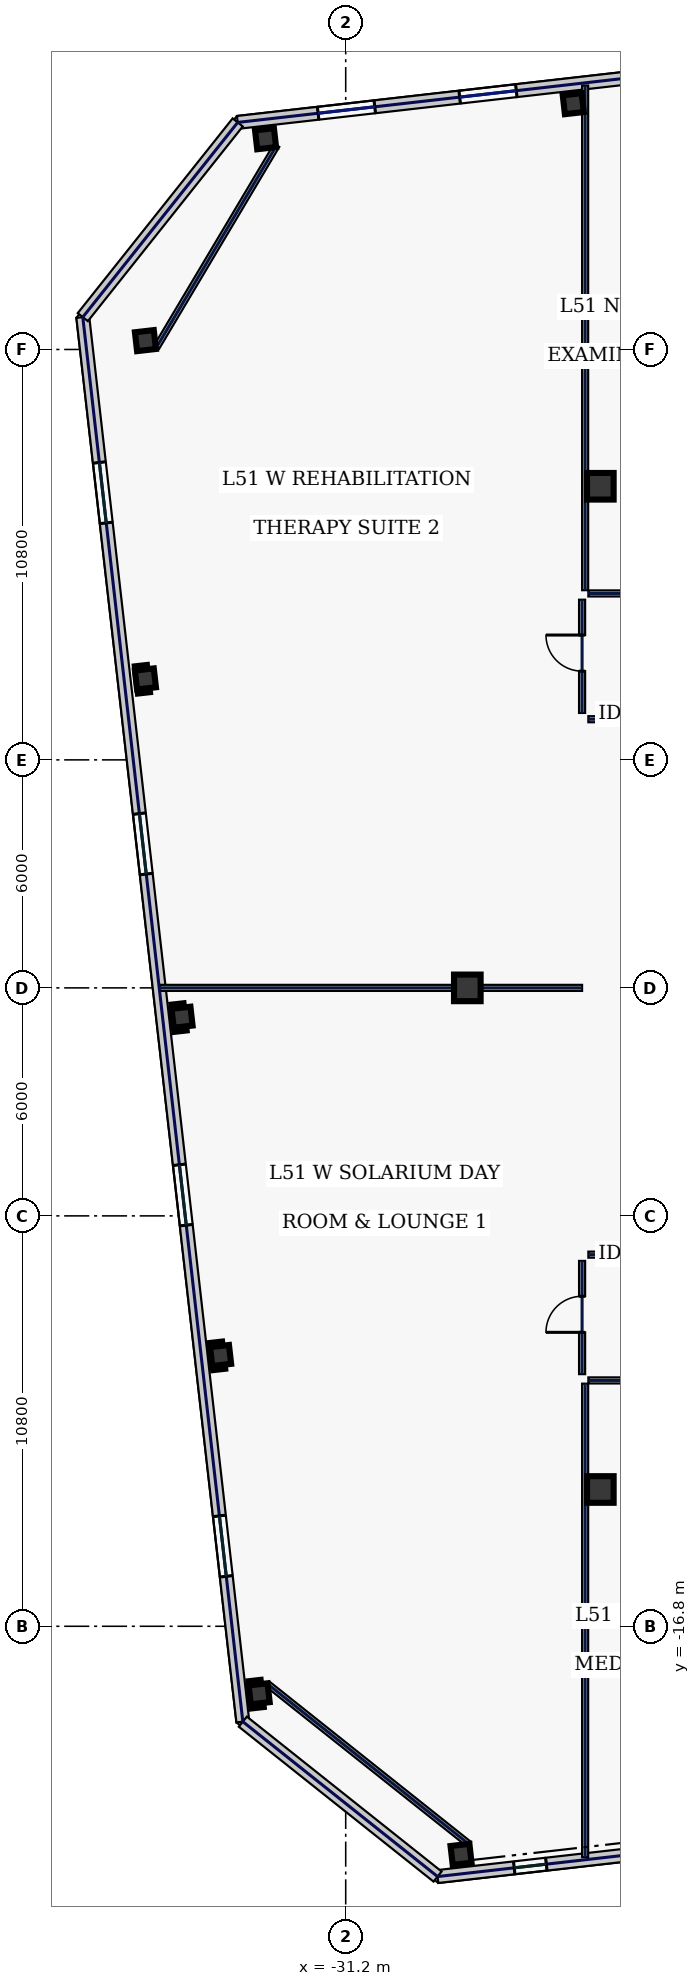
"""IFC4 building model, lengths in metres.
Left out: names, types, materials, properties, quantities, classifications, styles, units other than length and angle.
Written with IfcOpenShell. Run it as: python <this file> out.ifc"""

import sys

from ifc_helpers import new_model, si_unit, direction, frame, frame_2d, origin, origin_2d, place, context, subcontext, project, spatial, rectangle, hollow_rectangle, extrude, element, fill, save


model = new_model("IFC4")
c1 = context("Model", 3, precision=1e-05, world=origin(), true_north=direction((0.0, 1.0)))
c2 = subcontext(c1, "Body", "Model", "MODEL_VIEW")
j1 = project(units=[si_unit("LENGTHUNIT", "METRE"), si_unit("PLANEANGLEUNIT", "RADIAN")], contexts=[c1])
p1 = place(None, origin())
s1 = spatial("IfcSite", under=j1, at=p1, CompositionType="ELEMENT")
p2 = place(p1, origin())
s2 = spatial("IfcBuilding", under=s1, at=p2, CompositionType="ELEMENT")
p3 = place(p2, frame((0.0, 0.0, 222.2)))
s3 = spatial("IfcBuildingStorey", under=s2, at=p3, CompositionType="ELEMENT", Elevation=222.2)
for number, where, z_axis, x_axis in (
    (1, (-24.5, -13.2, 0.0), (0.0, 0.0, 1.0), (1.0, 0.0, 0.0)),
    (2, (-24.5, 13.2, 0.0), (0.0, 0.0, 1.0), (1.0, 0.0, 0.0)),
    (3, (-28.0, 0.0, 0.0), (0.0, 0.0, 1.0), (1.0, 0.0, 0.0)),
):
    element("IfcColumn", number, at=place(p3, frame(where, z_axis=z_axis, x_axis=x_axis)), inside=s3, PredefinedType="COLUMN", context=c2, shape_type="SweptSolid", body=[
        extrude(hollow_rectangle(XDim=0.7, YDim=0.7, WallThickness=0.032, at=origin_2d()), origin(), (0.0, 0.0, 1.0), 3.74),
    ])
for number, where, z_axis, x_axis in (
    (4, (-28.165, -22.802, 0.0), (0.0, 0.0, 1.0), (0.994, 0.113, 0.0)),
    (5, (-25.212, 23.268, 0.0), (0.0, 0.0, 1.0), (0.994, 0.113, 0.0)),
    (6, (-33.309, 22.345, 0.0), (0.0, 0.0, 1.0), (0.994, 0.113, 0.0)),
    (7, (-36.47, 17.033, 0.0), (0.0, 0.0, 1.0), (0.994, 0.113, 0.0)),
    (8, (-36.47, 8.131, 0.0), (0.0, 0.0, 1.0), (0.994, 0.113, 0.0)),
    (9, (-35.506, -0.772, 0.0), (0.0, 0.0, 1.0), (0.994, 0.113, 0.0)),
    (10, (-34.491, -9.674, 0.0), (0.0, 0.0, 1.0), (0.994, 0.113, 0.0)),
    (11, (-33.477, -18.577, 0.0), (0.0, 0.0, 1.0), (0.994, 0.113, 0.0)),
):
    element("IfcColumn", number, at=place(p3, frame(where, z_axis=z_axis, x_axis=x_axis)), inside=s3, PredefinedType="COLUMN", context=c2, shape_type="SweptSolid", body=[
        extrude(hollow_rectangle(XDim=0.5, YDim=0.5, WallThickness=0.025, at=origin_2d()), origin(), (0.0, 0.0, 1.0), 3.74),
    ])
p4 = place(p3, frame((-28.783, -23.386, 0.0), z_axis=(0.0, 0.0, 1.0), x_axis=(0.993572262951, 0.113199639106, 0.0)))
e12 = element("IfcWall", 12, at=p4, inside=s3, PredefinedType="STANDARD", context=c2, shape_type="SweptSolid", body=[
    extrude(rectangle(XDim=14.15, YDim=0.34, at=frame_2d((7.075, 0.0))), origin(), (0.0, 0.0, 1.0), 3.74),
])
p5 = place(p4, frame((2.03, 0.0, 0.88)))
e13 = element("IfcOpeningElement", 13, at=p5, cuts=e12, PredefinedType="OPENING", context=c2, shape_type="SweptSolid", body=[
    extrude(rectangle(XDim=0.85, YDim=1.85, at=frame_2d((0.425, 0.925))), frame((0.0, 0.18, 0.0), z_axis=(0.0, -1.0, 0.0), x_axis=(1.0, 0.0, 0.0)), (0.0, 0.0, 1.0), 0.36),
])
p6 = place(p4, frame((5.779, 0.0, 0.88)))
e14 = element("IfcOpeningElement", 14, at=p6, cuts=e12, PredefinedType="OPENING", context=c2, shape_type="SweptSolid", body=[
    extrude(rectangle(XDim=1.7, YDim=1.95, at=frame_2d((0.85, 0.975))), frame((0.0, 0.18, 0.0), z_axis=(0.0, -1.0, 0.0), x_axis=(1.0, 0.0, 0.0)), (0.0, 0.0, 1.0), 0.36),
])
p7 = place(p4, frame((10.179, 0.0, 0.88)))
e15 = element("IfcOpeningElement", 15, at=p7, cuts=e12, PredefinedType="OPENING", context=c2, shape_type="SweptSolid", body=[
    extrude(rectangle(XDim=1.7, YDim=1.95, at=frame_2d((0.85, 0.975))), frame((0.0, 0.18, 0.0), z_axis=(0.0, -1.0, 0.0), x_axis=(1.0, 0.0, 0.0)), (0.0, 0.0, 1.0), 0.36),
])
p8 = place(p3, frame((-15.51, 24.886, 0.0), z_axis=(0.0, 0.0, 1.0), x_axis=(-0.993572271362, -0.113199565282, 0.0)))
e16 = element("IfcWall", 16, at=p8, inside=s3, PredefinedType="STANDARD", context=c2, shape_type="SweptSolid", body=[
    extrude(rectangle(XDim=18.651, YDim=0.34, at=frame_2d((9.326, 0.0))), origin(), (0.0, 0.0, 1.0), 3.74),
])
p9 = place(p8, frame((15.021, 0.0, 0.83)))
e17 = element("IfcOpeningElement", 17, at=p9, cuts=e16, PredefinedType="OPENING", context=c2, shape_type="SweptSolid", body=[
    extrude(rectangle(XDim=1.5, YDim=2.0, at=frame_2d((0.75, 1.0))), frame((0.0, 0.18, 0.0), z_axis=(0.0, -1.0, 0.0), x_axis=(1.0, 0.0, 0.0)), (0.0, 0.0, 1.0), 0.36),
])
p10 = place(p8, frame((11.273, 0.0, 0.83)))
e18 = element("IfcOpeningElement", 18, at=p10, cuts=e16, PredefinedType="OPENING", context=c2, shape_type="SweptSolid", body=[
    extrude(rectangle(XDim=1.5, YDim=2.0, at=frame_2d((0.75, 1.0))), frame((0.0, 0.18, 0.0), z_axis=(0.0, -1.0, 0.0), x_axis=(1.0, 0.0, 0.0)), (0.0, 0.0, 1.0), 0.36),
])
p11 = place(p8, frame((6.873, 0.0, 0.83)))
e19 = element("IfcOpeningElement", 19, at=p11, cuts=e16, PredefinedType="OPENING", context=c2, shape_type="SweptSolid", body=[
    extrude(rectangle(XDim=1.5, YDim=2.0, at=frame_2d((0.75, 1.0))), frame((0.0, 0.18, 0.0), z_axis=(0.0, -1.0, 0.0), x_axis=(1.0, 0.0, 0.0)), (0.0, 0.0, 1.0), 0.36),
])
p12 = place(p8, frame((3.125, 0.0, 0.83)))
e20 = element("IfcOpeningElement", 20, at=p12, cuts=e16, PredefinedType="OPENING", context=c2, shape_type="SweptSolid", body=[
    extrude(rectangle(XDim=0.85, YDim=1.85, at=frame_2d((0.425, 0.925))), frame((0.0, 0.18, 0.0), z_axis=(0.0, -1.0, 0.0), x_axis=(1.0, 0.0, 0.0)), (0.0, 0.0, 1.0), 0.36),
])
p13 = place(p3, frame((-38.118, 17.651, 0.0), z_axis=(0.0, 0.0, 1.0), x_axis=(0.11320360501, -0.9935718111, 0.0)))
e21 = element("IfcWall", 21, at=p13, inside=s3, PredefinedType="STANDARD", context=c2, shape_type="SweptSolid", body=[
    extrude(rectangle(XDim=37.2, YDim=0.34, at=frame_2d((18.6, 0.0))), origin(), (0.0, 0.0, 1.0), 3.74),
])
p14 = place(p13, frame((3.85, 0.0, 0.58)))
e22 = element("IfcOpeningElement", 22, at=p14, cuts=e21, PredefinedType="OPENING", context=c2, shape_type="SweptSolid", body=[
    extrude(rectangle(XDim=1.6, YDim=2.3, at=frame_2d((0.8, 1.15))), frame((0.0, 0.18, 0.0), z_axis=(0.0, -1.0, 0.0), x_axis=(1.0, 0.0, 0.0)), (0.0, 0.0, 1.0), 0.36),
])
p15 = place(p13, frame((13.15, 0.0, 0.58)))
e23 = element("IfcOpeningElement", 23, at=p15, cuts=e21, PredefinedType="OPENING", context=c2, shape_type="SweptSolid", body=[
    extrude(rectangle(XDim=1.6, YDim=2.3, at=frame_2d((0.8, 1.15))), frame((0.0, 0.18, 0.0), z_axis=(0.0, -1.0, 0.0), x_axis=(1.0, 0.0, 0.0)), (0.0, 0.0, 1.0), 0.36),
])
p16 = place(p13, frame((22.45, 0.0, 0.58)))
e24 = element("IfcOpeningElement", 24, at=p16, cuts=e21, PredefinedType="OPENING", context=c2, shape_type="SweptSolid", body=[
    extrude(rectangle(XDim=1.6, YDim=2.3, at=frame_2d((0.8, 1.15))), frame((0.0, 0.18, 0.0), z_axis=(0.0, -1.0, 0.0), x_axis=(1.0, 0.0, 0.0)), (0.0, 0.0, 1.0), 0.36),
])
p17 = place(p13, frame((31.75, 0.0, 0.58)))
e25 = element("IfcOpeningElement", 25, at=p17, cuts=e21, PredefinedType="OPENING", context=c2, shape_type="SweptSolid", body=[
    extrude(rectangle(XDim=1.6, YDim=2.3, at=frame_2d((0.8, 1.15))), frame((0.0, 0.18, 0.0), z_axis=(0.0, -1.0, 0.0), x_axis=(1.0, 0.0, 0.0)), (0.0, 0.0, 1.0), 0.36),
])
for number, where, z_axis, x_axis in (
    (26, (-34.042, 22.775, 0.0), (0.0, 0.0, 1.0), (-0.623, -0.783, 0.0)),
    (27, (-33.907, -19.31, 0.0), (0.0, 0.0, 1.0), (0.783, -0.623, 0.0)),
):
    element("IfcWall", number, at=place(p3, frame(where, z_axis=z_axis, x_axis=x_axis)), inside=s3, PredefinedType="STANDARD", context=c2, shape_type="SweptSolid", body=[
        extrude(rectangle(XDim=6.548, YDim=0.34, at=frame_2d((3.274, 0.0))), origin(), (0.0, 0.0, 1.0), 3.74),
    ])
p18 = place(p3, frame((-33.016, 22.171, 0.0), z_axis=(0.0, 0.0, 1.0), x_axis=(-0.511385266265, -0.859351563359, 0.0)))
e28 = element("IfcWall", 28, at=p18, inside=s3, PredefinedType="PARTITIONING", context=c2, shape_type="SweptSolid", body=[
    extrude(rectangle(XDim=6.182, YDim=0.16, at=frame_2d((3.091, 0.0))), origin(), (0.0, 0.0, 1.0), 3.74),
])
p19 = place(p3, frame((-33.265, -18.311, 0.0), z_axis=(0.0, 0.0, 1.0), x_axis=(0.782602647064, -0.622521563328, 0.0)))
e29 = element("IfcWall", 29, at=p19, inside=s3, PredefinedType="PARTITIONING", context=c2, shape_type="SweptSolid", body=[
    extrude(rectangle(XDim=6.788, YDim=0.16, at=frame_2d((3.394, 0.0))), origin(), (0.0, 0.0, 1.0), 3.74),
])
p20 = place(p3, frame((-24.98, -10.165, 0.0), z_axis=(0.0, 0.0, 1.0), x_axis=(0.0, 1.0, 0.0)))
e30 = element("IfcWall", 30, at=p20, inside=s3, PredefinedType="PARTITIONING", context=c2, shape_type="SweptSolid", body=[
    extrude(rectangle(XDim=2.98, YDim=0.16, at=frame_2d((1.49, 0.0))), origin(), (0.0, 0.0, 1.0), 3.74),
])
p21 = place(p20, frame((1.1, 0.0, 0.0)))
e31 = element("IfcOpeningElement", 31, at=p21, cuts=e30, PredefinedType="OPENING", context=c2, shape_type="SweptSolid", body=[
    extrude(rectangle(XDim=0.95, YDim=2.2, at=frame_2d((0.475, 1.1))), frame((0.0, 0.09, 0.0), z_axis=(0.0, -1.0, 0.0), x_axis=(1.0, 0.0, 0.0)), (0.0, 0.0, 1.0), 0.18),
])
for number, where, z_axis, x_axis in (
    (32, (-24.815, -7.02, 0.0), (0.0, 0.0, 1.0), (1.0, 0.0, 0.0)),
    (33, (-10.715, 7.07, 0.0), (0.0, 0.0, 1.0), (-1.0, 0.0, 0.0)),
):
    element("IfcWall", number, at=place(p3, frame(where, z_axis=z_axis, x_axis=x_axis)), inside=s3, PredefinedType="PARTITIONING", context=c2, shape_type="SweptSolid", body=[
        extrude(rectangle(XDim=14.1, YDim=0.16, at=frame_2d((7.05, 0.0))), origin(), (0.0, 0.0, 1.0), 3.74),
    ])
p22 = place(p3, frame((-24.98, 7.235, 0.0), z_axis=(0.0, 0.0, 1.0), x_axis=(0.0, 1.0, 0.0)))
e34 = element("IfcWall", 34, at=p22, inside=s3, PredefinedType="PARTITIONING", context=c2, shape_type="SweptSolid", body=[
    extrude(rectangle(XDim=2.98, YDim=0.16, at=frame_2d((1.49, 0.0))), origin(), (0.0, 0.0, 1.0), 3.74),
])
p23 = place(p22, frame((1.1, 0.0, 0.0)))
e35 = element("IfcOpeningElement", 35, at=p23, cuts=e34, PredefinedType="OPENING", context=c2, shape_type="SweptSolid", body=[
    extrude(rectangle(XDim=0.95, YDim=2.2, at=frame_2d((0.475, 1.1))), frame((0.0, 0.09, 0.0), z_axis=(0.0, -1.0, 0.0), x_axis=(1.0, 0.0, 0.0)), (0.0, 0.0, 1.0), 0.18),
])
p24 = place(p3, frame((-24.815, 10.38, 0.0), z_axis=(0.0, 0.0, 1.0), x_axis=(1.0, 0.0, 0.0)))
e36 = element("IfcWall", 36, at=p24, inside=s3, PredefinedType="PARTITIONING", context=c2, shape_type="SweptSolid", body=[
    extrude(rectangle(XDim=49.63, YDim=0.16, at=frame_2d((24.815, 0.0))), origin(), (0.0, 0.0, 1.0), 3.74),
])
p25 = place(p24, frame((2.044, 0.0, 0.0)))
e37 = element("IfcOpeningElement", 37, at=p25, cuts=e36, PredefinedType="OPENING", context=c2, shape_type="SweptSolid", body=[
    extrude(rectangle(XDim=0.95, YDim=2.2, at=frame_2d((0.475, 1.1))), frame((0.0, 0.09, 0.0), z_axis=(0.0, -1.0, 0.0), x_axis=(1.0, 0.0, 0.0)), (0.0, 0.0, 1.0), 0.18),
])
p26 = place(p24, frame((6.72, 0.0, 0.0)))
e38 = element("IfcOpeningElement", 38, at=p26, cuts=e36, PredefinedType="OPENING", context=c2, shape_type="SweptSolid", body=[
    extrude(rectangle(XDim=0.95, YDim=2.2, at=frame_2d((0.475, 1.1))), frame((0.0, 0.09, 0.0), z_axis=(0.0, -1.0, 0.0), x_axis=(1.0, 0.0, 0.0)), (0.0, 0.0, 1.0), 0.18),
])
p27 = place(p24, frame((12.13, 0.0, 0.0)))
e39 = element("IfcOpeningElement", 39, at=p27, cuts=e36, PredefinedType="OPENING", context=c2, shape_type="SweptSolid", body=[
    extrude(rectangle(XDim=0.95, YDim=2.2, at=frame_2d((0.475, 1.1))), frame((0.0, 0.09, 0.0), z_axis=(0.0, -1.0, 0.0), x_axis=(1.0, 0.0, 0.0)), (0.0, 0.0, 1.0), 0.18),
])
p28 = place(p24, frame((17.235, 0.0, 0.0)))
e40 = element("IfcOpeningElement", 40, at=p28, cuts=e36, PredefinedType="OPENING", context=c2, shape_type="SweptSolid", body=[
    extrude(rectangle(XDim=1.3, YDim=2.2, at=frame_2d((0.65, 1.1))), frame((0.0, 0.09, 0.0), z_axis=(0.0, -1.0, 0.0), x_axis=(1.0, 0.0, 0.0)), (0.0, 0.0, 1.0), 0.18),
])
p29 = place(p24, frame((22.89, 0.0, 0.0)))
e41 = element("IfcOpeningElement", 41, at=p29, cuts=e36, PredefinedType="OPENING", context=c2, shape_type="SweptSolid", body=[
    extrude(rectangle(XDim=1.3, YDim=2.2, at=frame_2d((0.65, 1.1))), frame((0.0, 0.09, 0.0), z_axis=(0.0, -1.0, 0.0), x_axis=(1.0, 0.0, 0.0)), (0.0, 0.0, 1.0), 0.18),
])
p30 = place(p24, frame((27.925, 0.0, 0.0)))
e42 = element("IfcOpeningElement", 42, at=p30, cuts=e36, PredefinedType="OPENING", context=c2, shape_type="SweptSolid", body=[
    extrude(rectangle(XDim=0.95, YDim=2.2, at=frame_2d((0.475, 1.1))), frame((0.0, 0.09, 0.0), z_axis=(0.0, -1.0, 0.0), x_axis=(1.0, 0.0, 0.0)), (0.0, 0.0, 1.0), 0.18),
])
p31 = place(p24, frame((34.445, 0.0, 0.0)))
e43 = element("IfcOpeningElement", 43, at=p31, cuts=e36, PredefinedType="OPENING", context=c2, shape_type="SweptSolid", body=[
    extrude(rectangle(XDim=0.95, YDim=2.2, at=frame_2d((0.475, 1.1))), frame((0.0, 0.09, 0.0), z_axis=(0.0, -1.0, 0.0), x_axis=(1.0, 0.0, 0.0)), (0.0, 0.0, 1.0), 0.18),
])
p32 = place(p24, frame((39.645, 0.0, 0.0)))
e44 = element("IfcOpeningElement", 44, at=p32, cuts=e36, PredefinedType="OPENING", context=c2, shape_type="SweptSolid", body=[
    extrude(rectangle(XDim=0.95, YDim=2.2, at=frame_2d((0.475, 1.1))), frame((0.0, 0.09, 0.0), z_axis=(0.0, -1.0, 0.0), x_axis=(1.0, 0.0, 0.0)), (0.0, 0.0, 1.0), 0.18),
])
p33 = place(p24, frame((45.281, 0.0, 0.0)))
e45 = element("IfcOpeningElement", 45, at=p33, cuts=e36, PredefinedType="OPENING", context=c2, shape_type="SweptSolid", body=[
    extrude(rectangle(XDim=0.95, YDim=2.2, at=frame_2d((0.475, 1.1))), frame((0.0, 0.09, 0.0), z_axis=(0.0, -1.0, 0.0), x_axis=(1.0, 0.0, 0.0)), (0.0, 0.0, 1.0), 0.18),
])
p34 = place(p3, frame((24.815, -10.33, 0.0), z_axis=(0.0, 0.0, 1.0), x_axis=(-1.0, 0.0, 0.0)))
e46 = element("IfcWall", 46, at=p34, inside=s3, PredefinedType="PARTITIONING", context=c2, shape_type="SweptSolid", body=[
    extrude(rectangle(XDim=49.63, YDim=0.16, at=frame_2d((24.815, 0.0))), origin(), (0.0, 0.0, 1.0), 3.74),
])
p35 = place(p34, frame((46.631, 0.0, 0.0)))
e47 = element("IfcOpeningElement", 47, at=p35, cuts=e46, PredefinedType="OPENING", context=c2, shape_type="SweptSolid", body=[
    extrude(rectangle(XDim=1.3, YDim=2.2, at=frame_2d((0.65, 1.1))), frame((0.0, 0.09, 0.0), z_axis=(0.0, -1.0, 0.0), x_axis=(1.0, 0.0, 0.0)), (0.0, 0.0, 1.0), 0.18),
])
p36 = place(p34, frame((42.13, 0.0, 0.0)))
e48 = element("IfcOpeningElement", 48, at=p36, cuts=e46, PredefinedType="OPENING", context=c2, shape_type="SweptSolid", body=[
    extrude(rectangle(XDim=0.95, YDim=2.2, at=frame_2d((0.475, 1.1))), frame((0.0, 0.09, 0.0), z_axis=(0.0, -1.0, 0.0), x_axis=(1.0, 0.0, 0.0)), (0.0, 0.0, 1.0), 0.18),
])
p37 = place(p34, frame((33.55, 0.0, 0.0)))
e49 = element("IfcOpeningElement", 49, at=p37, cuts=e46, PredefinedType="OPENING", context=c2, shape_type="SweptSolid", body=[
    extrude(rectangle(XDim=1.15, YDim=2.2, at=frame_2d((0.575, 1.1))), frame((0.0, 0.09, 0.0), z_axis=(0.0, -1.0, 0.0), x_axis=(1.0, 0.0, 0.0)), (0.0, 0.0, 1.0), 0.18),
])
p38 = place(p34, frame((25.89, 0.0, 0.0)))
e50 = element("IfcOpeningElement", 50, at=p38, cuts=e46, PredefinedType="OPENING", context=c2, shape_type="SweptSolid", body=[
    extrude(rectangle(XDim=0.95, YDim=2.2, at=frame_2d((0.475, 1.1))), frame((0.0, 0.09, 0.0), z_axis=(0.0, -1.0, 0.0), x_axis=(1.0, 0.0, 0.0)), (0.0, 0.0, 1.0), 0.18),
])
p39 = place(p34, frame((14.965, 0.0, 0.0)))
e51 = element("IfcOpeningElement", 51, at=p39, cuts=e46, PredefinedType="OPENING", context=c2, shape_type="SweptSolid", body=[
    extrude(rectangle(XDim=0.95, YDim=2.2, at=frame_2d((0.475, 1.1))), frame((0.0, 0.09, 0.0), z_axis=(0.0, -1.0, 0.0), x_axis=(1.0, 0.0, 0.0)), (0.0, 0.0, 1.0), 0.18),
])
p40 = place(p34, frame((6.24, 0.0, 0.0)))
e52 = element("IfcOpeningElement", 52, at=p40, cuts=e46, PredefinedType="OPENING", context=c2, shape_type="SweptSolid", body=[
    extrude(rectangle(XDim=1.05, YDim=2.2, at=frame_2d((0.525, 1.1))), frame((0.0, 0.09, 0.0), z_axis=(0.0, -1.0, 0.0), x_axis=(1.0, 0.0, 0.0)), (0.0, 0.0, 1.0), 0.18),
])
p41 = place(p34, frame((1.869, 0.0, 0.0)))
e53 = element("IfcOpeningElement", 53, at=p41, cuts=e46, PredefinedType="OPENING", context=c2, shape_type="SweptSolid", body=[
    extrude(rectangle(XDim=1.3, YDim=2.2, at=frame_2d((0.65, 1.1))), frame((0.0, 0.09, 0.0), z_axis=(0.0, -1.0, 0.0), x_axis=(1.0, 0.0, 0.0)), (0.0, 0.0, 1.0), 0.18),
])
p42 = place(p3, frame((-24.9, 10.465, 0.0), z_axis=(0.0, 0.0, 1.0), x_axis=(0.0, 1.0, 0.0)))
e54 = element("IfcWall", 54, at=p42, inside=s3, PredefinedType="PARTITIONING", context=c2, shape_type="SweptSolid", body=[
    extrude(rectangle(XDim=13.281, YDim=0.16, at=frame_2d((6.641, 0.0))), origin(), (0.0, 0.0, 1.0), 2.135),
])
p43 = place(p3, frame((-24.9, -22.873, 0.0), z_axis=(0.0, 0.0, 1.0), x_axis=(0.0, 1.0, 0.0)))
e55 = element("IfcWall", 55, at=p43, inside=s3, PredefinedType="PARTITIONING", context=c2, shape_type="SweptSolid", body=[
    extrude(rectangle(XDim=12.458, YDim=0.16, at=frame_2d((6.229, 0.0))), origin(), (0.0, 0.0, 1.0), 3.74),
])
p44 = place(p3, frame((-36.087, 0.0, 0.0), z_axis=(0.0, 0.0, 1.0), x_axis=(1.0, 0.0, 0.0)))
e56 = element("IfcWall", 56, at=p44, inside=s3, PredefinedType="PARTITIONING", context=c2, shape_type="SweptSolid", body=[
    extrude(rectangle(XDim=11.107, YDim=0.16, at=frame_2d((5.553, 0.0))), origin(), (0.0, 0.0, 1.0), 2.135),
])
p45 = place(p5, origin())
e57 = element("IfcWindow", 57, at=p45, inside=s3, PartitioningType="SINGLE_PANEL", PredefinedType="WINDOW", context=c2, shape_type="SweptSolid", body=[
    extrude(rectangle(XDim=0.85, YDim=1.85, at=frame_2d((0.425, 0.925))), frame((0.0, 0.03, 0.0), z_axis=(0.0, -1.0, 0.0), x_axis=(1.0, 0.0, 0.0)), (0.0, 0.0, 1.0), 0.06),
])
fill(e13, e57)
p46 = place(p9, origin())
e58 = element("IfcWindow", 58, at=p46, inside=s3, PartitioningType="SINGLE_PANEL", PredefinedType="WINDOW", context=c2, shape_type="SweptSolid", body=[
    extrude(rectangle(XDim=1.5, YDim=2.0, at=frame_2d((0.75, 1.0))), frame((0.0, 0.03, 0.0), z_axis=(0.0, -1.0, 0.0), x_axis=(1.0, 0.0, 0.0)), (0.0, 0.0, 1.0), 0.06),
])
fill(e17, e58)
p47 = place(p10, origin())
e59 = element("IfcWindow", 59, at=p47, inside=s3, PartitioningType="SINGLE_PANEL", PredefinedType="WINDOW", context=c2, shape_type="SweptSolid", body=[
    extrude(rectangle(XDim=1.5, YDim=2.0, at=frame_2d((0.75, 1.0))), frame((0.0, 0.03, 0.0), z_axis=(0.0, -1.0, 0.0), x_axis=(1.0, 0.0, 0.0)), (0.0, 0.0, 1.0), 0.06),
])
fill(e18, e59)
p48 = place(p14, origin())
e60 = element("IfcWindow", 60, at=p48, inside=s3, PartitioningType="SINGLE_PANEL", PredefinedType="WINDOW", context=c2, shape_type="SweptSolid", body=[
    extrude(rectangle(XDim=1.6, YDim=2.3, at=frame_2d((0.8, 1.15))), frame((0.0, 0.03, 0.0), z_axis=(0.0, -1.0, 0.0), x_axis=(1.0, 0.0, 0.0)), (0.0, 0.0, 1.0), 0.06),
])
fill(e22, e60)
p49 = place(p15, origin())
e61 = element("IfcWindow", 61, at=p49, inside=s3, PartitioningType="SINGLE_PANEL", PredefinedType="WINDOW", context=c2, shape_type="SweptSolid", body=[
    extrude(rectangle(XDim=1.6, YDim=2.3, at=frame_2d((0.8, 1.15))), frame((0.0, 0.03, 0.0), z_axis=(0.0, -1.0, 0.0), x_axis=(1.0, 0.0, 0.0)), (0.0, 0.0, 1.0), 0.06),
])
fill(e23, e61)
p50 = place(p16, origin())
e62 = element("IfcWindow", 62, at=p50, inside=s3, PartitioningType="SINGLE_PANEL", PredefinedType="WINDOW", context=c2, shape_type="SweptSolid", body=[
    extrude(rectangle(XDim=1.6, YDim=2.3, at=frame_2d((0.8, 1.15))), frame((0.0, 0.03, 0.0), z_axis=(0.0, -1.0, 0.0), x_axis=(1.0, 0.0, 0.0)), (0.0, 0.0, 1.0), 0.06),
])
fill(e24, e62)
p51 = place(p17, origin())
e63 = element("IfcWindow", 63, at=p51, inside=s3, PartitioningType="SINGLE_PANEL", PredefinedType="WINDOW", context=c2, shape_type="SweptSolid", body=[
    extrude(rectangle(XDim=1.6, YDim=2.3, at=frame_2d((0.8, 1.15))), frame((0.0, 0.03, 0.0), z_axis=(0.0, -1.0, 0.0), x_axis=(1.0, 0.0, 0.0)), (0.0, 0.0, 1.0), 0.06),
])
fill(e25, e63)
p52 = place(p21, origin())
e64 = element("IfcDoor", 64, at=p52, inside=s3, OperationType="SINGLE_SWING_LEFT", PredefinedType="DOOR", context=c2, shape_type="SweptSolid", body=[
    extrude(rectangle(XDim=0.95, YDim=2.2, at=frame_2d((0.475, 1.1))), frame((0.0, 0.025, 0.0), z_axis=(0.0, -1.0, 0.0), x_axis=(1.0, 0.0, 0.0)), (0.0, 0.0, 1.0), 0.05),
])
fill(e31, e64)
p53 = place(p23, origin())
e65 = element("IfcDoor", 65, at=p53, inside=s3, OperationType="SINGLE_SWING_RIGHT", PredefinedType="DOOR", context=c2, shape_type="SweptSolid", body=[
    extrude(rectangle(XDim=0.95, YDim=2.2, at=frame_2d((0.475, 1.1))), frame((0.0, 0.025, 0.0), z_axis=(0.0, -1.0, 0.0), x_axis=(1.0, 0.0, 0.0)), (0.0, 0.0, 1.0), 0.05),
])
fill(e35, e65)
save(model, sys.argv[1])
